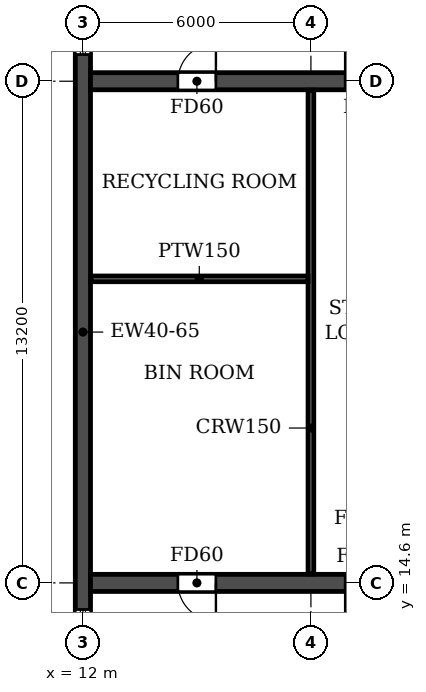
"""IFC4 building model, lengths in metres.
Left out: names, types, materials, properties, quantities, classifications, styles, units other than length and angle.
Written with IfcOpenShell. Run it as: python <this file> out.ifc"""

import sys

from ifc_helpers import new_model, si_unit, direction, frame, frame_2d, origin, place, context, subcontext, project, spatial, rectangle, extrude, element, fill, save


model = new_model("IFC4")
c1 = context("Model", 3, precision=1e-05, world=origin(), true_north=direction((0.0, 1.0)))
c2 = subcontext(c1, "Body", "Model", "MODEL_VIEW")
j1 = project(units=[si_unit("LENGTHUNIT", "METRE"), si_unit("PLANEANGLEUNIT", "RADIAN")], contexts=[c1])
p1 = place(None, origin())
s1 = spatial("IfcSite", under=j1, at=p1, CompositionType="ELEMENT")
p2 = place(p1, origin())
s2 = spatial("IfcBuilding", under=s1, at=p2, CompositionType="ELEMENT")
p3 = place(p2, frame((0.0, 0.0, 152.1)))
s3 = spatial("IfcBuildingStorey", under=s2, at=p3, CompositionType="ELEMENT", Elevation=152.1)
p4 = place(p3, frame((12.0, 4.683, 0.0), z_axis=(0.0, 0.0, 1.0), x_axis=(0.0, 1.0, 0.0)))
e1 = element("IfcWall", 1, at=p4, inside=s3, PredefinedType="SHEAR", context=c2, shape_type="SweptSolid", body=[
    extrude(rectangle(XDim=33.034, YDim=0.4, at=frame_2d((16.517, 0.0))), origin(), (0.0, 0.0, 1.0), 3.07),
])
p5 = place(p4, frame((23.817, 0.0, 0.9)))
e2 = element("IfcOpeningElement", 2, at=p5, cuts=e1, PredefinedType="OPENING", context=c2, shape_type="SweptSolid", body=[
    extrude(rectangle(XDim=1.2, YDim=1.5, at=frame_2d((0.6, 0.75))), frame((0.0, 0.21, 0.0), z_axis=(0.0, -1.0, 0.0), x_axis=(1.0, 0.0, 0.0)), (0.0, 0.0, 1.0), 0.42),
])
p6 = place(p4, frame((8.017, 0.0, 0.9)))
e3 = element("IfcOpeningElement", 3, at=p6, cuts=e1, PredefinedType="OPENING", context=c2, shape_type="SweptSolid", body=[
    extrude(rectangle(XDim=1.2, YDim=1.5, at=frame_2d((0.6, 0.75))), frame((0.0, 0.21, 0.0), z_axis=(0.0, -1.0, 0.0), x_axis=(1.0, 0.0, 0.0)), (0.0, 0.0, 1.0), 0.42),
])
p7 = place(p4, frame((28.293, 0.0, 0.6)))
e4 = element("IfcOpeningElement", 4, at=p7, cuts=e1, PredefinedType="OPENING", context=c2, shape_type="SweptSolid", body=[
    extrude(rectangle(XDim=2.2, YDim=1.8, at=frame_2d((1.1, 0.9))), frame((0.0, 0.21, 0.0), z_axis=(0.0, -1.0, 0.0), x_axis=(1.0, 0.0, 0.0)), (0.0, 0.0, 1.0), 0.42),
])
p8 = place(p4, frame((2.541, 0.0, 0.6)))
e5 = element("IfcOpeningElement", 5, at=p8, cuts=e1, PredefinedType="OPENING", context=c2, shape_type="SweptSolid", body=[
    extrude(rectangle(XDim=2.2, YDim=1.8, at=frame_2d((1.1, 0.9))), frame((0.0, 0.21, 0.0), z_axis=(0.0, -1.0, 0.0), x_axis=(1.0, 0.0, 0.0)), (0.0, 0.0, 1.0), 0.42),
])
p9 = place(p3, frame((12.2, 14.6, 0.0), z_axis=(0.0, 0.0, 1.0), x_axis=(1.0, 0.0, 0.0)))
e6 = element("IfcWall", 6, at=p9, inside=s3, PredefinedType="SOLIDWALL", context=c2, shape_type="SweptSolid", body=[
    extrude(rectangle(XDim=77.6, YDim=0.45, at=frame_2d((38.8, 0.0))), origin(), (0.0, 0.0, 1.0), 3.07),
])
p10 = place(p9, frame((2.3, 0.0, 0.0)))
e7 = element("IfcOpeningElement", 7, at=p10, cuts=e6, PredefinedType="OPENING", context=c2, shape_type="SweptSolid", body=[
    extrude(rectangle(XDim=1.0, YDim=2.1, at=frame_2d((0.5, 1.05))), frame((0.0, 0.235, 0.0), z_axis=(0.0, -1.0, 0.0), x_axis=(1.0, 0.0, 0.0)), (0.0, 0.0, 1.0), 0.47),
])
p11 = place(p9, frame((6.7, 0.0, 0.0)))
e8 = element("IfcOpeningElement", 8, at=p11, cuts=e6, PredefinedType="OPENING", context=c2, shape_type="SweptSolid", body=[
    extrude(rectangle(XDim=1.0, YDim=2.1, at=frame_2d((0.5, 1.05))), frame((0.0, 0.235, 0.0), z_axis=(0.0, -1.0, 0.0), x_axis=(1.0, 0.0, 0.0)), (0.0, 0.0, 1.0), 0.47),
])
p12 = place(p9, frame((14.6, 0.0, 0.0)))
e9 = element("IfcOpeningElement", 9, at=p12, cuts=e6, PredefinedType="OPENING", context=c2, shape_type="SweptSolid", body=[
    extrude(rectangle(XDim=1.0, YDim=2.1, at=frame_2d((0.5, 1.05))), frame((0.0, 0.235, 0.0), z_axis=(0.0, -1.0, 0.0), x_axis=(1.0, 0.0, 0.0)), (0.0, 0.0, 1.0), 0.47),
])
p13 = place(p9, frame((19.2, 0.0, 0.0)))
e10 = element("IfcOpeningElement", 10, at=p13, cuts=e6, PredefinedType="OPENING", context=c2, shape_type="SweptSolid", body=[
    extrude(rectangle(XDim=1.0, YDim=2.1, at=frame_2d((0.5, 1.05))), frame((0.0, 0.235, 0.0), z_axis=(0.0, -1.0, 0.0), x_axis=(1.0, 0.0, 0.0)), (0.0, 0.0, 1.0), 0.47),
])
p14 = place(p9, frame((30.5, 0.0, 0.0)))
e11 = element("IfcOpeningElement", 11, at=p14, cuts=e6, PredefinedType="OPENING", context=c2, shape_type="SweptSolid", body=[
    extrude(rectangle(XDim=1.0, YDim=2.1, at=frame_2d((0.5, 1.05))), frame((0.0, 0.235, 0.0), z_axis=(0.0, -1.0, 0.0), x_axis=(1.0, 0.0, 0.0)), (0.0, 0.0, 1.0), 0.47),
])
p15 = place(p9, frame((34.15, 0.0, 0.0)))
e12 = element("IfcOpeningElement", 12, at=p15, cuts=e6, PredefinedType="OPENING", context=c2, shape_type="SweptSolid", body=[
    extrude(rectangle(XDim=1.5, YDim=2.1, at=frame_2d((0.75, 1.05))), frame((0.0, 0.235, 0.0), z_axis=(0.0, -1.0, 0.0), x_axis=(1.0, 0.0, 0.0)), (0.0, 0.0, 1.0), 0.47),
])
p16 = place(p9, frame((38.3, 0.0, 0.0)))
e13 = element("IfcOpeningElement", 13, at=p16, cuts=e6, PredefinedType="OPENING", context=c2, shape_type="SweptSolid", body=[
    extrude(rectangle(XDim=1.0, YDim=2.1, at=frame_2d((0.5, 1.05))), frame((0.0, 0.235, 0.0), z_axis=(0.0, -1.0, 0.0), x_axis=(1.0, 0.0, 0.0)), (0.0, 0.0, 1.0), 0.47),
])
p17 = place(p9, frame((43.5, 0.0, 0.0)))
e14 = element("IfcOpeningElement", 14, at=p17, cuts=e6, PredefinedType="OPENING", context=c2, shape_type="SweptSolid", body=[
    extrude(rectangle(XDim=1.0, YDim=2.1, at=frame_2d((0.5, 1.05))), frame((0.0, 0.235, 0.0), z_axis=(0.0, -1.0, 0.0), x_axis=(1.0, 0.0, 0.0)), (0.0, 0.0, 1.0), 0.47),
])
p18 = place(p9, frame((57.4, 0.0, 0.0)))
e15 = element("IfcOpeningElement", 15, at=p18, cuts=e6, PredefinedType="OPENING", context=c2, shape_type="SweptSolid", body=[
    extrude(rectangle(XDim=1.0, YDim=2.1, at=frame_2d((0.5, 1.05))), frame((0.0, 0.235, 0.0), z_axis=(0.0, -1.0, 0.0), x_axis=(1.0, 0.0, 0.0)), (0.0, 0.0, 1.0), 0.47),
])
p19 = place(p9, frame((62.0, 0.0, 0.0)))
e16 = element("IfcOpeningElement", 16, at=p19, cuts=e6, PredefinedType="OPENING", context=c2, shape_type="SweptSolid", body=[
    extrude(rectangle(XDim=1.0, YDim=2.1, at=frame_2d((0.5, 1.05))), frame((0.0, 0.235, 0.0), z_axis=(0.0, -1.0, 0.0), x_axis=(1.0, 0.0, 0.0)), (0.0, 0.0, 1.0), 0.47),
])
p20 = place(p9, frame((69.9, 0.0, 0.0)))
e17 = element("IfcOpeningElement", 17, at=p20, cuts=e6, PredefinedType="OPENING", context=c2, shape_type="SweptSolid", body=[
    extrude(rectangle(XDim=1.0, YDim=2.1, at=frame_2d((0.5, 1.05))), frame((0.0, 0.235, 0.0), z_axis=(0.0, -1.0, 0.0), x_axis=(1.0, 0.0, 0.0)), (0.0, 0.0, 1.0), 0.47),
])
p21 = place(p9, frame((74.3, 0.0, 0.0)))
e18 = element("IfcOpeningElement", 18, at=p21, cuts=e6, PredefinedType="OPENING", context=c2, shape_type="SweptSolid", body=[
    extrude(rectangle(XDim=1.0, YDim=2.1, at=frame_2d((0.5, 1.05))), frame((0.0, 0.235, 0.0), z_axis=(0.0, -1.0, 0.0), x_axis=(1.0, 0.0, 0.0)), (0.0, 0.0, 1.0), 0.47),
])
p22 = place(p3, frame((12.2, 27.8, 0.0), z_axis=(0.0, 0.0, 1.0), x_axis=(1.0, 0.0, 0.0)))
e19 = element("IfcWall", 19, at=p22, inside=s3, PredefinedType="SOLIDWALL", context=c2, shape_type="SweptSolid", body=[
    extrude(rectangle(XDim=77.6, YDim=0.45, at=frame_2d((38.8, 0.0))), origin(), (0.0, 0.0, 1.0), 3.07),
])
p23 = place(p22, frame((2.3, 0.0, 0.0)))
e20 = element("IfcOpeningElement", 20, at=p23, cuts=e19, PredefinedType="OPENING", context=c2, shape_type="SweptSolid", body=[
    extrude(rectangle(XDim=1.0, YDim=2.1, at=frame_2d((0.5, 1.05))), frame((0.0, 0.235, 0.0), z_axis=(0.0, -1.0, 0.0), x_axis=(1.0, 0.0, 0.0)), (0.0, 0.0, 1.0), 0.47),
])
p24 = place(p22, frame((6.7, 0.0, 0.0)))
e21 = element("IfcOpeningElement", 21, at=p24, cuts=e19, PredefinedType="OPENING", context=c2, shape_type="SweptSolid", body=[
    extrude(rectangle(XDim=1.0, YDim=2.1, at=frame_2d((0.5, 1.05))), frame((0.0, 0.235, 0.0), z_axis=(0.0, -1.0, 0.0), x_axis=(1.0, 0.0, 0.0)), (0.0, 0.0, 1.0), 0.47),
])
p25 = place(p22, frame((10.05, 0.0, 0.0)))
e22 = element("IfcOpeningElement", 22, at=p25, cuts=e19, PredefinedType="OPENING", context=c2, shape_type="SweptSolid", body=[
    extrude(rectangle(XDim=0.9, YDim=2.1, at=frame_2d((0.45, 1.05))), frame((0.0, 0.235, 0.0), z_axis=(0.0, -1.0, 0.0), x_axis=(1.0, 0.0, 0.0)), (0.0, 0.0, 1.0), 0.47),
])
p26 = place(p22, frame((19.25, 0.0, 0.0)))
e23 = element("IfcOpeningElement", 23, at=p26, cuts=e19, PredefinedType="OPENING", context=c2, shape_type="SweptSolid", body=[
    extrude(rectangle(XDim=0.9, YDim=2.1, at=frame_2d((0.45, 1.05))), frame((0.0, 0.235, 0.0), z_axis=(0.0, -1.0, 0.0), x_axis=(1.0, 0.0, 0.0)), (0.0, 0.0, 1.0), 0.47),
])
p27 = place(p22, frame((22.4, 0.0, 0.0)))
e24 = element("IfcOpeningElement", 24, at=p27, cuts=e19, PredefinedType="OPENING", context=c2, shape_type="SweptSolid", body=[
    extrude(rectangle(XDim=1.0, YDim=2.1, at=frame_2d((0.5, 1.05))), frame((0.0, 0.235, 0.0), z_axis=(0.0, -1.0, 0.0), x_axis=(1.0, 0.0, 0.0)), (0.0, 0.0, 1.0), 0.47),
])
p28 = place(p22, frame((27.6, 0.0, 0.0)))
e25 = element("IfcOpeningElement", 25, at=p28, cuts=e19, PredefinedType="OPENING", context=c2, shape_type="SweptSolid", body=[
    extrude(rectangle(XDim=1.0, YDim=2.1, at=frame_2d((0.5, 1.05))), frame((0.0, 0.235, 0.0), z_axis=(0.0, -1.0, 0.0), x_axis=(1.0, 0.0, 0.0)), (0.0, 0.0, 1.0), 0.47),
])
p29 = place(p22, frame((35.4, 0.0, 0.0)))
e26 = element("IfcOpeningElement", 26, at=p29, cuts=e19, PredefinedType="OPENING", context=c2, shape_type="SweptSolid", body=[
    extrude(rectangle(XDim=1.0, YDim=2.1, at=frame_2d((0.5, 1.05))), frame((0.0, 0.235, 0.0), z_axis=(0.0, -1.0, 0.0), x_axis=(1.0, 0.0, 0.0)), (0.0, 0.0, 1.0), 0.47),
])
p30 = place(p22, frame((38.3, 0.0, 0.0)))
e27 = element("IfcOpeningElement", 27, at=p30, cuts=e19, PredefinedType="OPENING", context=c2, shape_type="SweptSolid", body=[
    extrude(rectangle(XDim=1.0, YDim=2.1, at=frame_2d((0.5, 1.05))), frame((0.0, 0.235, 0.0), z_axis=(0.0, -1.0, 0.0), x_axis=(1.0, 0.0, 0.0)), (0.0, 0.0, 1.0), 0.47),
])
p31 = place(p22, frame((42.25, 0.0, 0.0)))
e28 = element("IfcOpeningElement", 28, at=p31, cuts=e19, PredefinedType="OPENING", context=c2, shape_type="SweptSolid", body=[
    extrude(rectangle(XDim=1.5, YDim=2.1, at=frame_2d((0.75, 1.05))), frame((0.0, 0.235, 0.0), z_axis=(0.0, -1.0, 0.0), x_axis=(1.0, 0.0, 0.0)), (0.0, 0.0, 1.0), 0.47),
])
p32 = place(p22, frame((47.7, 0.0, 0.0)))
e29 = element("IfcOpeningElement", 29, at=p32, cuts=e19, PredefinedType="OPENING", context=c2, shape_type="SweptSolid", body=[
    extrude(rectangle(XDim=1.0, YDim=2.1, at=frame_2d((0.5, 1.05))), frame((0.0, 0.235, 0.0), z_axis=(0.0, -1.0, 0.0), x_axis=(1.0, 0.0, 0.0)), (0.0, 0.0, 1.0), 0.47),
])
p33 = place(p22, frame((51.6, 0.0, 0.0)))
e30 = element("IfcOpeningElement", 30, at=p33, cuts=e19, PredefinedType="OPENING", context=c2, shape_type="SweptSolid", body=[
    extrude(rectangle(XDim=1.0, YDim=2.1, at=frame_2d((0.5, 1.05))), frame((0.0, 0.235, 0.0), z_axis=(0.0, -1.0, 0.0), x_axis=(1.0, 0.0, 0.0)), (0.0, 0.0, 1.0), 0.47),
])
p34 = place(p22, frame((54.2, 0.0, 0.0)))
e31 = element("IfcOpeningElement", 31, at=p34, cuts=e19, PredefinedType="OPENING", context=c2, shape_type="SweptSolid", body=[
    extrude(rectangle(XDim=1.0, YDim=2.1, at=frame_2d((0.5, 1.05))), frame((0.0, 0.235, 0.0), z_axis=(0.0, -1.0, 0.0), x_axis=(1.0, 0.0, 0.0)), (0.0, 0.0, 1.0), 0.47),
])
p35 = place(p22, frame((57.45, 0.0, 0.0)))
e32 = element("IfcOpeningElement", 32, at=p35, cuts=e19, PredefinedType="OPENING", context=c2, shape_type="SweptSolid", body=[
    extrude(rectangle(XDim=0.9, YDim=2.1, at=frame_2d((0.45, 1.05))), frame((0.0, 0.235, 0.0), z_axis=(0.0, -1.0, 0.0), x_axis=(1.0, 0.0, 0.0)), (0.0, 0.0, 1.0), 0.47),
])
p36 = place(p22, frame((66.65, 0.0, 0.0)))
e33 = element("IfcOpeningElement", 33, at=p36, cuts=e19, PredefinedType="OPENING", context=c2, shape_type="SweptSolid", body=[
    extrude(rectangle(XDim=0.9, YDim=2.1, at=frame_2d((0.45, 1.05))), frame((0.0, 0.235, 0.0), z_axis=(0.0, -1.0, 0.0), x_axis=(1.0, 0.0, 0.0)), (0.0, 0.0, 1.0), 0.47),
])
p37 = place(p22, frame((69.9, 0.0, 0.0)))
e34 = element("IfcOpeningElement", 34, at=p37, cuts=e19, PredefinedType="OPENING", context=c2, shape_type="SweptSolid", body=[
    extrude(rectangle(XDim=1.0, YDim=2.1, at=frame_2d((0.5, 1.05))), frame((0.0, 0.235, 0.0), z_axis=(0.0, -1.0, 0.0), x_axis=(1.0, 0.0, 0.0)), (0.0, 0.0, 1.0), 0.47),
])
p38 = place(p22, frame((74.3, 0.0, 0.0)))
e35 = element("IfcOpeningElement", 35, at=p38, cuts=e19, PredefinedType="OPENING", context=c2, shape_type="SweptSolid", body=[
    extrude(rectangle(XDim=1.0, YDim=2.1, at=frame_2d((0.5, 1.05))), frame((0.0, 0.235, 0.0), z_axis=(0.0, -1.0, 0.0), x_axis=(1.0, 0.0, 0.0)), (0.0, 0.0, 1.0), 0.47),
])
p39 = place(p3, frame((18.0, 14.835, 0.0), z_axis=(0.0, 0.0, 1.0), x_axis=(0.0, 1.0, 0.0)))
e36 = element("IfcWall", 36, at=p39, inside=s3, PredefinedType="PARTITIONING", context=c2, shape_type="SweptSolid", body=[
    extrude(rectangle(XDim=12.73, YDim=0.15, at=frame_2d((6.365, 0.0))), origin(), (0.0, 0.0, 1.0), 3.07),
])
p40 = place(p3, frame((12.21, 22.6, 0.0), z_axis=(0.0, 0.0, 1.0), x_axis=(1.0, 0.0, 0.0)))
e37 = element("IfcWall", 37, at=p40, inside=s3, PredefinedType="PARTITIONING", context=c2, shape_type="SweptSolid", body=[
    extrude(rectangle(XDim=5.715, YDim=0.15, at=frame_2d((2.857, 0.0))), origin(), (0.0, 0.0, 1.0), 3.07),
])
p41 = place(p5, origin())
e38 = element("IfcWindow", 38, at=p41, inside=s3, PartitioningType="SINGLE_PANEL", PredefinedType="WINDOW", context=c2, shape_type="SweptSolid", body=[
    extrude(rectangle(XDim=1.2, YDim=1.5, at=frame_2d((0.6, 0.75))), frame((0.0, 0.03, 0.0), z_axis=(0.0, -1.0, 0.0), x_axis=(1.0, 0.0, 0.0)), (0.0, 0.0, 1.0), 0.06),
])
fill(e2, e38)
p42 = place(p6, origin())
e39 = element("IfcWindow", 39, at=p42, inside=s3, PartitioningType="SINGLE_PANEL", PredefinedType="WINDOW", context=c2, shape_type="SweptSolid", body=[
    extrude(rectangle(XDim=1.2, YDim=1.5, at=frame_2d((0.6, 0.75))), frame((0.0, 0.03, 0.0), z_axis=(0.0, -1.0, 0.0), x_axis=(1.0, 0.0, 0.0)), (0.0, 0.0, 1.0), 0.06),
])
fill(e3, e39)
p43 = place(p23, origin())
e40 = element("IfcDoor", 40, at=p43, inside=s3, OperationType="SINGLE_SWING_RIGHT", PredefinedType="DOOR", context=c2, shape_type="SweptSolid", body=[
    extrude(rectangle(XDim=1.0, YDim=2.1, at=frame_2d((0.5, 1.05))), frame((0.0, 0.025, 0.0), z_axis=(0.0, -1.0, 0.0), x_axis=(1.0, 0.0, 0.0)), (0.0, 0.0, 1.0), 0.05),
])
fill(e20, e40)
p44 = place(p24, origin())
e41 = element("IfcDoor", 41, at=p44, inside=s3, OperationType="SINGLE_SWING_LEFT", PredefinedType="DOOR", context=c2, shape_type="SweptSolid", body=[
    extrude(rectangle(XDim=1.0, YDim=2.1, at=frame_2d((0.5, 1.05))), frame((0.0, 0.025, 0.0), z_axis=(0.0, -1.0, 0.0), x_axis=(1.0, 0.0, 0.0)), (0.0, 0.0, 1.0), 0.05),
])
fill(e21, e41)
p45 = place(p10, frame((1.0, 0.0, 0.0), z_axis=(0.0, 0.0, 1.0), x_axis=(-1.0, 0.0, 0.0)))
e42 = element("IfcDoor", 42, at=p45, inside=s3, OperationType="SINGLE_SWING_LEFT", PredefinedType="DOOR", context=c2, shape_type="SweptSolid", body=[
    extrude(rectangle(XDim=1.0, YDim=2.1, at=frame_2d((0.5, 1.05))), frame((0.0, 0.025, 0.0), z_axis=(0.0, -1.0, 0.0), x_axis=(1.0, 0.0, 0.0)), (0.0, 0.0, 1.0), 0.05),
])
fill(e7, e42)
p46 = place(p11, frame((1.0, 0.0, 0.0), z_axis=(0.0, 0.0, 1.0), x_axis=(-1.0, 0.0, 0.0)))
e43 = element("IfcDoor", 43, at=p46, inside=s3, OperationType="SINGLE_SWING_RIGHT", PredefinedType="DOOR", context=c2, shape_type="SweptSolid", body=[
    extrude(rectangle(XDim=1.0, YDim=2.1, at=frame_2d((0.5, 1.05))), frame((0.0, 0.025, 0.0), z_axis=(0.0, -1.0, 0.0), x_axis=(1.0, 0.0, 0.0)), (0.0, 0.0, 1.0), 0.05),
])
fill(e8, e43)
save(model, sys.argv[1])
